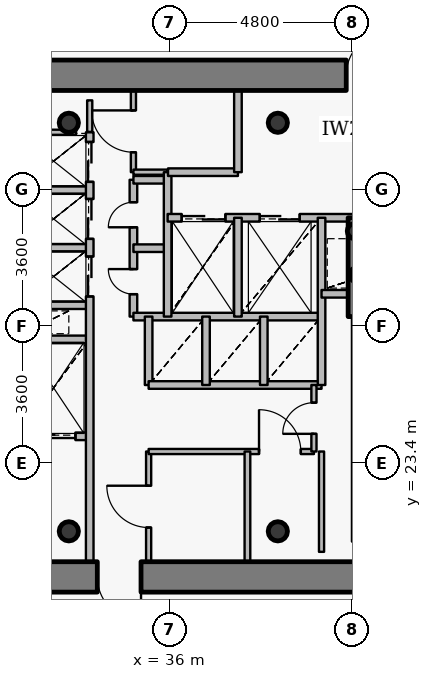
"""IFC4 building model, lengths in metres.
Left out: names, types, materials, properties, quantities, classifications, styles, units other than length and angle.
Written with IfcOpenShell. Run it as: python <this file> out.ifc"""

import sys

from ifc_helpers import new_model, si_unit, direction, frame, frame_2d, origin, origin_2d, place, context, subcontext, project, spatial, rectangle, hollow_circle, extrude, source, transform, mapped, element, fill, save


model = new_model("IFC4")
c1 = context("Model", 3, precision=1e-05, world=origin(), true_north=direction((0.0, 1.0)))
c2 = subcontext(c1, "Body", "Model", "MODEL_VIEW")
j1 = project(units=[si_unit("LENGTHUNIT", "METRE"), si_unit("PLANEANGLEUNIT", "RADIAN")], contexts=[c1])
p1 = place(None, origin())
s1 = spatial("IfcSite", under=j1, at=p1, CompositionType="ELEMENT")
p2 = place(p1, origin())
s2 = spatial("IfcBuilding", under=s1, at=p2, CompositionType="ELEMENT")
p3 = place(p2, frame((0.0, 0.0, 193.65)))
s3 = spatial("IfcBuildingStorey", under=s2, at=p3, CompositionType="ELEMENT", Elevation=193.65)
for number, where, z_axis, x_axis in (
    (1, (33.35, 21.6, 0.0), (0.0, 0.0, 1.0), (1.0, 0.0, 0.0)),
    (2, (38.85, 21.6, 0.0), (0.0, 0.0, 1.0), (1.0, 0.0, 0.0)),
    (3, (38.85, 32.35, 0.0), (0.0, 0.0, 1.0), (1.0, 0.0, 0.0)),
    (4, (33.35, 32.35, 0.0), (0.0, 0.0, 1.0), (1.0, 0.0, 0.0)),
):
    element("IfcColumn", number, at=place(p3, frame(where, z_axis=z_axis, x_axis=x_axis)), inside=s3, PredefinedType="COLUMN", context=c2, shape_type="SweptSolid", body=[
        extrude(hollow_circle(Radius=0.254, WallThickness=0.02, at=origin_2d()), origin(), (0.0, 0.0, 1.0), 3.75),
    ])
for number, where, z_axis, x_axis in (
    (5, (40.95, 28.35, 0.0), (0.0, 0.0, 1.0), (1.0, 0.0, 0.0)),
    (6, (40.88, 29.5, 0.0), (0.0, 0.0, 1.0), (1.0, 0.0, 0.0)),
):
    element("IfcColumn", number, at=place(p3, frame(where, z_axis=z_axis, x_axis=x_axis)), inside=s3, PredefinedType="COLUMN", context=c2, shape_type="SweptSolid", body=[
        extrude(hollow_circle(Radius=0.203, WallThickness=0.016, at=origin_2d()), origin(), (0.0, 0.0, 1.0), 3.75),
    ])
p4 = place(p3, frame((27.2, 33.6, 0.0), z_axis=(0.0, 0.0, 1.0), x_axis=(1.0, 0.0, 0.0)))
e7 = element("IfcWall", 7, at=p4, inside=s3, PredefinedType="SHEAR", context=c2, shape_type="SweptSolid", body=[
    extrude(rectangle(XDim=17.6, YDim=0.8, at=frame_2d((8.8, 0.0))), origin(), (0.0, 0.0, 1.0), 2.95),
])
p5 = place(p4, frame((13.45, 0.0, 0.0)))
e8 = element("IfcOpeningElement", 8, at=p5, cuts=e7, PredefinedType="OPENING", context=c2, shape_type="SweptSolid", body=[
    extrude(rectangle(XDim=1.15, YDim=2.15, at=origin_2d()), frame((0.575, 0.41, 1.075), z_axis=(0.0, -1.0, 0.0), x_axis=(1.0, 0.0, 0.0)), (0.0, 0.0, 1.0), 0.82),
])
p6 = place(p3, frame((44.8, 20.4, 0.0), z_axis=(0.0, 0.0, 1.0), x_axis=(-1.0, 0.0, 0.0)))
e9 = element("IfcWall", 9, at=p6, inside=s3, PredefinedType="SHEAR", context=c2, shape_type="SweptSolid", body=[
    extrude(rectangle(XDim=17.6, YDim=0.8, at=frame_2d((8.8, 0.0))), origin(), (0.0, 0.0, 1.0), 2.95),
])
p7 = place(p6, frame((9.55, 0.0, 0.0)))
e10 = element("IfcOpeningElement", 10, at=p7, cuts=e9, PredefinedType="OPENING", context=c2, shape_type="SweptSolid", body=[
    extrude(rectangle(XDim=1.15, YDim=2.15, at=origin_2d()), frame((0.575, 0.41, 1.075), z_axis=(0.0, -1.0, 0.0), x_axis=(1.0, 0.0, 0.0)), (0.0, 0.0, 1.0), 0.82),
])
p8 = place(p3, frame((40.9, 27.25, 0.0), z_axis=(0.0, 0.0, 1.0), x_axis=(0.0, 1.0, 0.0)))
e11 = element("IfcWall", 11, at=p8, inside=s3, PredefinedType="SHEAR", context=c2, shape_type="SweptSolid", body=[
    extrude(rectangle(XDim=2.6, YDim=0.4, at=frame_2d((1.3, 0.0))), origin(), (0.0, 0.0, 1.0), 3.1),
])
p9 = place(p3, frame((32.0, 24.1, 0.0), z_axis=(0.0, 0.0, 1.0), x_axis=(1.0, 0.0, 0.0)))
e12 = element("IfcWall", 12, at=p9, inside=s3, PredefinedType="PARTITIONING", context=c2, shape_type="SweptSolid", body=[
    extrude(rectangle(XDim=1.9, YDim=0.2, at=frame_2d((0.95, 0.0))), origin(), (0.0, 0.0, 1.0), 3.085),
])
p10 = place(p9, frame((0.375, 0.0, 0.0)))
e13 = element("IfcOpeningElement", 13, at=p10, cuts=e12, PredefinedType="OPENING", context=c2, shape_type="SweptSolid", body=[
    extrude(rectangle(XDim=1.15, YDim=2.15, at=origin_2d()), frame((0.575, 0.11, 1.075), z_axis=(0.0, -1.0, 0.0), x_axis=(1.0, 0.0, 0.0)), (0.0, 0.0, 1.0), 0.22),
])
for number, where, z_axis, x_axis in (
    (14, (32.0, 26.65, 0.0), (0.0, 0.0, 1.0), (1.0, 0.0, 0.0)),
    (15, (32.0, 27.55, 0.0), (0.0, 0.0, 1.0), (1.0, 0.0, 0.0)),
    (16, (32.0, 29.06, 0.0), (0.0, 0.0, 1.0), (1.0, 0.0, 0.0)),
    (17, (32.0, 30.58, 0.0), (0.0, 0.0, 1.0), (1.0, 0.0, 0.0)),
):
    element("IfcWall", number, at=place(p3, frame(where, z_axis=z_axis, x_axis=x_axis)), inside=s3, PredefinedType="PARTITIONING", context=c2, shape_type="SweptSolid", body=[
        extrude(rectangle(XDim=1.9, YDim=0.2, at=frame_2d((0.95, 0.0))), origin(), (0.0, 0.0, 1.0), 3.085),
    ])
p11 = place(p3, frame((33.9, 20.8, 0.0), z_axis=(0.0, 0.0, 1.0), x_axis=(0.0, 1.0, 0.0)))
e18 = element("IfcWall", 18, at=p11, inside=s3, PredefinedType="PARTITIONING", context=c2, shape_type="SweptSolid", body=[
    extrude(rectangle(XDim=11.3, YDim=0.2, at=frame_2d((5.65, 0.0))), origin(), (0.0, 0.0, 1.0), 3.085),
])
p12 = place(p11, frame((6.98, 0.0, 0.0)))
e19 = element("IfcOpeningElement", 19, at=p12, cuts=e18, PredefinedType="OPENING", context=c2, shape_type="SweptSolid", body=[
    extrude(rectangle(XDim=1.05, YDim=2.15, at=origin_2d()), frame((0.525, 0.11, 1.075), z_axis=(0.0, -1.0, 0.0), x_axis=(1.0, 0.0, 0.0)), (0.0, 0.0, 1.0), 0.22),
])
p13 = place(p11, frame((8.495, 0.0, 0.0)))
e20 = element("IfcOpeningElement", 20, at=p13, cuts=e18, PredefinedType="OPENING", context=c2, shape_type="SweptSolid", body=[
    extrude(rectangle(XDim=1.05, YDim=2.15, at=origin_2d()), frame((0.525, 0.11, 1.075), z_axis=(0.0, -1.0, 0.0), x_axis=(1.0, 0.0, 0.0)), (0.0, 0.0, 1.0), 0.22),
])
p14 = place(p11, frame((9.995, 0.0, 0.0)))
e21 = element("IfcOpeningElement", 21, at=p14, cuts=e18, PredefinedType="OPENING", context=c2, shape_type="SweptSolid", body=[
    extrude(rectangle(XDim=1.05, YDim=2.15, at=origin_2d()), frame((0.525, 0.11, 1.075), z_axis=(0.0, -1.0, 0.0), x_axis=(1.0, 0.0, 0.0)), (0.0, 0.0, 1.0), 0.22),
])
p15 = place(p3, frame((35.05, 27.25, 0.0), z_axis=(0.0, 0.0, 1.0), x_axis=(0.0, 1.0, 0.0)))
e22 = element("IfcWall", 22, at=p15, inside=s3, PredefinedType="PARTITIONING", context=c2, shape_type="SweptSolid", body=[
    extrude(rectangle(XDim=3.6, YDim=0.2, at=frame_2d((1.8, 0.0))), origin(), (0.0, 0.0, 1.0), 3.5),
])
p16 = place(p15, frame((0.59, 0.0, 0.0)))
e23 = element("IfcOpeningElement", 23, at=p16, cuts=e22, PredefinedType="OPENING", context=c2, shape_type="SweptSolid", body=[
    extrude(rectangle(XDim=0.66, YDim=2.05, at=origin_2d()), frame((0.33, 0.11, 1.025), z_axis=(0.0, -1.0, 0.0), x_axis=(1.0, 0.0, 0.0)), (0.0, 0.0, 1.0), 0.22),
])
p17 = place(p15, frame((2.35, 0.0, 0.0)))
e24 = element("IfcOpeningElement", 24, at=p17, cuts=e22, PredefinedType="OPENING", context=c2, shape_type="SweptSolid", body=[
    extrude(rectangle(XDim=0.66, YDim=2.05, at=origin_2d()), frame((0.33, 0.11, 1.025), z_axis=(0.0, -1.0, 0.0), x_axis=(1.0, 0.0, 0.0)), (0.0, 0.0, 1.0), 0.22),
])
p18 = place(p3, frame((35.05, 27.25, 0.0), z_axis=(0.0, 0.0, 1.0), x_axis=(1.0, 0.0, 0.0)))
e25 = element("IfcWall", 25, at=p18, inside=s3, PredefinedType="PARTITIONING", context=c2, shape_type="SweptSolid", body=[
    extrude(rectangle(XDim=4.95, YDim=0.2, at=frame_2d((2.475, 0.0))), origin(), (0.0, 0.0, 1.0), 3.085),
])
for number, where, z_axis, x_axis in (
    (26, (35.05, 29.05, 0.0), (0.0, 0.0, 1.0), (1.0, 0.0, 0.0)),
    (27, (35.05, 30.85, 0.0), (0.0, 0.0, 1.0), (1.0, 0.0, 0.0)),
):
    element("IfcWall", number, at=place(p3, frame(where, z_axis=z_axis, x_axis=x_axis)), inside=s3, PredefinedType="PARTITIONING", context=c2, shape_type="SweptSolid", body=[
        extrude(rectangle(XDim=0.9, YDim=0.2, at=frame_2d((0.45, 0.0))), origin(), (0.0, 0.0, 1.0), 3.5),
    ])
p19 = place(p3, frame((35.05, 31.05, 0.0), z_axis=(0.0, 0.0, 1.0), x_axis=(0.0, 1.0, 0.0)))
e28 = element("IfcWall", 28, at=p19, inside=s3, PredefinedType="PARTITIONING", context=c2, shape_type="SweptSolid", body=[
    extrude(rectangle(XDim=2.15, YDim=0.135, at=frame_2d((1.075, 0.0))), origin(), (0.0, 0.0, 1.0), 3.085),
])
p20 = place(p19, frame((0.525, 0.0, 0.0)))
e29 = element("IfcOpeningElement", 29, at=p20, cuts=e28, PredefinedType="OPENING", context=c2, shape_type="SweptSolid", body=[
    extrude(rectangle(XDim=1.1, YDim=2.15, at=origin_2d()), frame((0.55, 0.078, 1.075), z_axis=(0.0, -1.0, 0.0), x_axis=(1.0, 0.0, 0.0)), (0.0, 0.0, 1.0), 0.155),
])
p21 = place(p3, frame((35.05, 31.05, 0.0), z_axis=(0.0, 0.0, 1.0), x_axis=(1.0, 0.0, 0.0)))
e30 = element("IfcWall", 30, at=p21, inside=s3, PredefinedType="PARTITIONING", context=c2, shape_type="SweptSolid", body=[
    extrude(rectangle(XDim=0.9, YDim=0.135, at=frame_2d((0.45, 0.0))), origin(), (0.0, 0.0, 1.0), 3.5),
])
p22 = place(p3, frame((35.45, 20.8, 0.0), z_axis=(0.0, 0.0, 1.0), x_axis=(0.0, 1.0, 0.0)))
e31 = element("IfcWall", 31, at=p22, inside=s3, PredefinedType="PARTITIONING", context=c2, shape_type="SweptSolid", body=[
    extrude(rectangle(XDim=2.9, YDim=0.135, at=frame_2d((1.45, 0.0))), origin(), (0.0, 0.0, 1.0), 3.085),
])
p23 = place(p22, frame((0.9, 0.0, 0.0)))
e32 = element("IfcOpeningElement", 32, at=p23, cuts=e31, PredefinedType="OPENING", context=c2, shape_type="SweptSolid", body=[
    extrude(rectangle(XDim=1.1, YDim=2.15, at=origin_2d()), frame((0.55, 0.078, 1.075), z_axis=(0.0, -1.0, 0.0), x_axis=(1.0, 0.0, 0.0)), (0.0, 0.0, 1.0), 0.155),
])
p24 = place(p3, frame((35.45, 23.7, 0.0), z_axis=(0.0, 0.0, 1.0), x_axis=(1.0, 0.0, 0.0)))
e33 = element("IfcWall", 33, at=p24, inside=s3, PredefinedType="PARTITIONING", context=c2, shape_type="SweptSolid", body=[
    extrude(rectangle(XDim=4.35, YDim=0.135, at=frame_2d((2.175, 0.0))), origin(), (0.0, 0.0, 1.0), 3.085),
])
p25 = place(p24, frame((2.905, 0.0, 0.0)))
e34 = element("IfcOpeningElement", 34, at=p25, cuts=e33, PredefinedType="OPENING", context=c2, shape_type="SweptSolid", body=[
    extrude(rectangle(XDim=1.1, YDim=2.15, at=origin_2d()), frame((0.55, 0.078, 1.075), z_axis=(0.0, -1.0, 0.0), x_axis=(1.0, 0.0, 0.0)), (0.0, 0.0, 1.0), 0.155),
])
p26 = place(p3, frame((35.45, 25.45, 0.0), z_axis=(0.0, 0.0, 1.0), x_axis=(0.0, 1.0, 0.0)))
e35 = element("IfcWall", 35, at=p26, inside=s3, PredefinedType="PARTITIONING", context=c2, shape_type="SweptSolid", body=[
    extrude(rectangle(XDim=1.8, YDim=0.2, at=frame_2d((0.9, 0.0))), origin(), (0.0, 0.0, 1.0), 3.5),
])
p27 = place(p3, frame((35.45, 25.45, 0.0), z_axis=(0.0, 0.0, 1.0), x_axis=(1.0, 0.0, 0.0)))
e36 = element("IfcWall", 36, at=p27, inside=s3, PredefinedType="PARTITIONING", context=c2, shape_type="SweptSolid", body=[
    extrude(rectangle(XDim=4.55, YDim=0.2, at=frame_2d((2.275, 0.0))), origin(), (0.0, 0.0, 1.0), 3.085),
])
p28 = place(p3, frame((35.95, 27.25, 0.0), z_axis=(0.0, 0.0, 1.0), x_axis=(0.0, 1.0, 0.0)))
e37 = element("IfcWall", 37, at=p28, inside=s3, PredefinedType="PARTITIONING", context=c2, shape_type="SweptSolid", body=[
    extrude(rectangle(XDim=3.8, YDim=0.2, at=frame_2d((1.9, 0.0))), origin(), (0.0, 0.0, 1.0), 3.5),
])
p29 = place(p3, frame((35.95, 29.85, 0.0), z_axis=(0.0, 0.0, 1.0), x_axis=(1.0, 0.0, 0.0)))
e38 = element("IfcWall", 38, at=p29, inside=s3, PredefinedType="PARTITIONING", context=c2, shape_type="SweptSolid", body=[
    extrude(rectangle(XDim=8.49, YDim=0.2, at=frame_2d((4.245, 0.0))), origin(), (0.0, 0.0, 1.0), 3.085),
])
p30 = place(p29, frame((6.1, 0.0, 0.0)))
e39 = element("IfcOpeningElement", 39, at=p30, cuts=e38, PredefinedType="OPENING", context=c2, shape_type="SweptSolid", body=[
    extrude(rectangle(XDim=1.2, YDim=2.15, at=origin_2d()), frame((0.6, 0.11, 1.075), z_axis=(0.0, -1.0, 0.0), x_axis=(1.0, 0.0, 0.0)), (0.0, 0.0, 1.0), 0.22),
])
p31 = place(p29, frame((0.37, 0.0, 0.0)))
e40 = element("IfcOpeningElement", 40, at=p31, cuts=e38, PredefinedType="OPENING", context=c2, shape_type="SweptSolid", body=[
    extrude(rectangle(XDim=1.15, YDim=2.15, at=origin_2d()), frame((0.575, 0.11, 1.075), z_axis=(0.0, -1.0, 0.0), x_axis=(1.0, 0.0, 0.0)), (0.0, 0.0, 1.0), 0.22),
])
p32 = place(p29, frame((2.425, 0.0, 0.0)))
e41 = element("IfcOpeningElement", 41, at=p32, cuts=e38, PredefinedType="OPENING", context=c2, shape_type="SweptSolid", body=[
    extrude(rectangle(XDim=1.05, YDim=2.15, at=origin_2d()), frame((0.525, 0.11, 1.075), z_axis=(0.0, -1.0, 0.0), x_axis=(1.0, 0.0, 0.0)), (0.0, 0.0, 1.0), 0.22),
])
p33 = place(p3, frame((35.96, 31.05, 0.0), z_axis=(0.0, 0.0, 1.0), x_axis=(1.0, 0.0, 0.0)))
e42 = element("IfcWall", 42, at=p33, inside=s3, PredefinedType="PARTITIONING", context=c2, shape_type="SweptSolid", body=[
    extrude(rectangle(XDim=1.84, YDim=0.2, at=frame_2d((0.92, 0.0))), origin(), (0.0, 0.0, 1.0), 3.5),
])
p34 = place(p3, frame((36.96, 25.45, 0.0), z_axis=(0.0, 0.0, 1.0), x_axis=(0.0, 1.0, 0.0)))
e43 = element("IfcWall", 43, at=p34, inside=s3, PredefinedType="PARTITIONING", context=c2, shape_type="SweptSolid", body=[
    extrude(rectangle(XDim=1.8, YDim=0.2, at=frame_2d((0.9, 0.0))), origin(), (0.0, 0.0, 1.0), 3.5),
])
p35 = place(p3, frame((37.8, 27.25, 0.0), z_axis=(0.0, 0.0, 1.0), x_axis=(0.0, 1.0, 0.0)))
e44 = element("IfcWall", 44, at=p35, inside=s3, PredefinedType="PARTITIONING", context=c2, shape_type="SweptSolid", body=[
    extrude(rectangle(XDim=2.6, YDim=0.2, at=frame_2d((1.3, 0.0))), origin(), (0.0, 0.0, 1.0), 3.5),
])
p36 = place(p3, frame((37.8, 31.05, 0.0), z_axis=(0.0, 0.0, 1.0), x_axis=(0.0, 1.0, 0.0)))
e45 = element("IfcWall", 45, at=p36, inside=s3, PredefinedType="PARTITIONING", context=c2, shape_type="SweptSolid", body=[
    extrude(rectangle(XDim=2.15, YDim=0.2, at=frame_2d((1.075, 0.0))), origin(), (0.0, 0.0, 1.0), 3.085),
])
p37 = place(p3, frame((38.05, 20.18, 0.0), z_axis=(0.0, 0.0, 1.0), x_axis=(0.0, 1.0, 0.0)))
e46 = element("IfcWall", 46, at=p37, inside=s3, PredefinedType="PARTITIONING", context=c2, shape_type="SweptSolid", body=[
    extrude(rectangle(XDim=3.52, YDim=0.15, at=frame_2d((1.76, 0.0))), origin(), (0.0, 0.0, 1.0), 2.935),
])
p38 = place(p3, frame((38.48, 25.45, 0.0), z_axis=(0.0, 0.0, 1.0), x_axis=(0.0, 1.0, 0.0)))
e47 = element("IfcWall", 47, at=p38, inside=s3, PredefinedType="PARTITIONING", context=c2, shape_type="SweptSolid", body=[
    extrude(rectangle(XDim=1.8, YDim=0.2, at=frame_2d((0.9, 0.0))), origin(), (0.0, 0.0, 1.0), 3.5),
])
p39 = place(p3, frame((39.8, 23.7, 0.0), z_axis=(0.0, 0.0, 1.0), x_axis=(0.0, 1.0, 0.0)))
e48 = element("IfcWall", 48, at=p39, inside=s3, PredefinedType="PARTITIONING", context=c2, shape_type="SweptSolid", body=[
    extrude(rectangle(XDim=1.75, YDim=0.135, at=frame_2d((0.875, 0.0))), origin(), (0.0, 0.0, 1.0), 3.5),
])
p40 = place(p39, frame((0.465, 0.0, 0.0)))
e49 = element("IfcOpeningElement", 49, at=p40, cuts=e48, PredefinedType="OPENING", context=c2, shape_type="SweptSolid", body=[
    extrude(rectangle(XDim=0.82, YDim=2.1, at=origin_2d()), frame((0.41, 0.078, 1.05), z_axis=(0.0, -1.0, 0.0), x_axis=(1.0, 0.0, 0.0)), (0.0, 0.0, 1.0), 0.155),
])
p41 = place(p3, frame((40.0, 25.45, 0.0), z_axis=(0.0, 0.0, 1.0), x_axis=(0.0, 1.0, 0.0)))
e50 = element("IfcWall", 50, at=p41, inside=s3, PredefinedType="PARTITIONING", context=c2, shape_type="SweptSolid", body=[
    extrude(rectangle(XDim=4.4, YDim=0.2, at=frame_2d((2.2, 0.0))), origin(), (0.0, 0.0, 1.0), 3.5),
])
p42 = place(p3, frame((40.0, 27.85, 0.0), z_axis=(0.0, 0.0, 1.0), x_axis=(1.0, 0.0, 0.0)))
e51 = element("IfcWall", 51, at=p42, inside=s3, PredefinedType="PARTITIONING", context=c2, shape_type="SweptSolid", body=[
    extrude(rectangle(XDim=0.9, YDim=0.2, at=frame_2d((0.45, 0.0))), origin(), (0.0, 0.0, 1.0), 3.5),
])
p43 = place(p3, frame((40.9, 21.33, 0.0), z_axis=(0.0, 0.0, 1.0), x_axis=(0.0, 1.0, 0.0)))
e52 = element("IfcWall", 52, at=p43, inside=s3, PredefinedType="PARTITIONING", context=c2, shape_type="SweptSolid", body=[
    extrude(rectangle(XDim=5.91, YDim=0.2, at=frame_2d((2.955, 0.0))), origin(), (0.0, 0.0, 1.0), 3.035),
])
p44 = place(p3, frame((32.36, 32.1, 0.0), z_axis=(0.0, 0.0, 1.0), x_axis=(1.0, 0.0, 0.0)))
e53 = element("IfcWall", 53, at=p44, inside=s3, PredefinedType="PARTITIONING", context=c2, shape_type="SweptSolid", body=[
    extrude(rectangle(XDim=1.18, YDim=0.135, at=frame_2d((0.59, 0.0))), origin(), (0.0, 0.0, 1.0), 3.085),
])
p45 = place(p3, frame((40.0, 23.7, 0.0), z_axis=(0.0, 0.0, 1.0), x_axis=(0.0, -1.0, 0.0)))
e54 = element("IfcWall", 54, at=p45, inside=s3, PredefinedType="PARTITIONING", context=c2, shape_type="SweptSolid", body=[
    extrude(rectangle(XDim=2.64, YDim=0.135, at=frame_2d((1.32, 0.0))), origin(), (0.0, 0.0, 1.0), 3.035),
])
p46 = place(p3, frame((33.9, 32.11, 0.0), z_axis=(0.0, 0.0, 1.0), x_axis=(0.0, 1.0, 0.0)))
e55 = element("IfcWall", 55, at=p46, inside=s3, PredefinedType="PARTITIONING", context=c2, shape_type="SweptSolid", body=[
    extrude(rectangle(XDim=0.83, YDim=0.135, at=frame_2d((0.415, 0.0))), origin(), (0.0, 0.0, 1.0), 3.085),
])
m1 = source(origin(), c2, "Body", "SweptSolid", [
    extrude(rectangle(XDim=1.15, YDim=2.15, at=origin_2d()), frame((0.575, 0.025, 1.075), z_axis=(0.0, -1.0, 0.0), x_axis=(1.0, 0.0, 0.0)), (0.0, 0.0, 1.0), 0.05),
])
p47 = place(p5, origin())
e56 = element("IfcDoor", 56, at=p47, inside=s3, OperationType="SINGLE_SWING_RIGHT", PredefinedType="DOOR", context=c2, shape_type="MappedRepresentation", body=[
    mapped(m1, transform((0.0, 0.0, 0.0), x_axis=(1.0, 0.0, 0.0), y_axis=(0.0, 1.0, 0.0), z_axis=(0.0, 0.0, 1.0), scale=1.0)),
])
fill(e8, e56)
p48 = place(p7, origin())
e57 = element("IfcDoor", 57, at=p48, inside=s3, OperationType="SINGLE_SWING_LEFT", PredefinedType="DOOR", context=c2, shape_type="MappedRepresentation", body=[
    mapped(m1, transform((0.0, 0.0, 0.0), x_axis=(1.0, 0.0, 0.0), y_axis=(0.0, 1.0, 0.0), z_axis=(0.0, 0.0, 1.0), scale=1.0)),
])
fill(e10, e57)
m2 = source(origin(), c2, "Body", "SweptSolid", [
    extrude(rectangle(XDim=1.15, YDim=2.15, at=origin_2d()), frame((0.575, 0.025, 1.075), z_axis=(0.0, -1.0, 0.0), x_axis=(1.0, 0.0, 0.0)), (0.0, 0.0, 1.0), 0.05),
])
p49 = place(p31, origin())
e58 = element("IfcDoor", 58, at=p49, inside=s3, OperationType="DOUBLE_DOOR_SLIDING", PredefinedType="USERDEFINED", context=c2, shape_type="MappedRepresentation", body=[
    mapped(m2, transform((0.0, 0.0, 0.0), x_axis=(1.0, 0.0, 0.0), y_axis=(0.0, 1.0, 0.0), z_axis=(0.0, 0.0, 1.0), scale=1.0)),
])
fill(e40, e58)
p50 = place(p10, origin())
e59 = element("IfcDoor", 59, at=p50, inside=s3, OperationType="DOUBLE_DOOR_SLIDING", PredefinedType="USERDEFINED", context=c2, shape_type="MappedRepresentation", body=[
    mapped(m2, transform((0.0, 0.0, 0.0), x_axis=(1.0, 0.0, 0.0), y_axis=(0.0, 1.0, 0.0), z_axis=(0.0, 0.0, 1.0), scale=1.0)),
])
fill(e13, e59)
m3 = source(origin(), c2, "Body", "SweptSolid", [
    extrude(rectangle(XDim=1.05, YDim=2.15, at=origin_2d()), frame((0.525, 0.025, 1.075), z_axis=(0.0, -1.0, 0.0), x_axis=(1.0, 0.0, 0.0)), (0.0, 0.0, 1.0), 0.05),
])
p51 = place(p32, origin())
e60 = element("IfcDoor", 60, at=p51, inside=s3, OperationType="DOUBLE_DOOR_SLIDING", PredefinedType="USERDEFINED", context=c2, shape_type="MappedRepresentation", body=[
    mapped(m3, transform((0.0, 0.0, 0.0), x_axis=(1.0, 0.0, 0.0), y_axis=(0.0, 1.0, 0.0), z_axis=(0.0, 0.0, 1.0), scale=1.0)),
])
fill(e41, e60)
p52 = place(p12, origin())
e61 = element("IfcDoor", 61, at=p52, inside=s3, OperationType="DOUBLE_DOOR_SLIDING", PredefinedType="USERDEFINED", context=c2, shape_type="MappedRepresentation", body=[
    mapped(m3, transform((0.0, 0.0, 0.0), x_axis=(1.0, 0.0, 0.0), y_axis=(0.0, 1.0, 0.0), z_axis=(0.0, 0.0, 1.0), scale=1.0)),
])
fill(e19, e61)
p53 = place(p13, origin())
e62 = element("IfcDoor", 62, at=p53, inside=s3, OperationType="DOUBLE_DOOR_SLIDING", PredefinedType="USERDEFINED", context=c2, shape_type="MappedRepresentation", body=[
    mapped(m3, transform((0.0, 0.0, 0.0), x_axis=(1.0, 0.0, 0.0), y_axis=(0.0, 1.0, 0.0), z_axis=(0.0, 0.0, 1.0), scale=1.0)),
])
fill(e20, e62)
p54 = place(p14, origin())
e63 = element("IfcDoor", 63, at=p54, inside=s3, OperationType="DOUBLE_DOOR_SLIDING", PredefinedType="USERDEFINED", context=c2, shape_type="MappedRepresentation", body=[
    mapped(m3, transform((0.0, 0.0, 0.0), x_axis=(1.0, 0.0, 0.0), y_axis=(0.0, 1.0, 0.0), z_axis=(0.0, 0.0, 1.0), scale=1.0)),
])
fill(e21, e63)
m4 = source(origin(), c2, "Body", "SweptSolid", [
    extrude(rectangle(XDim=0.66, YDim=2.05, at=origin_2d()), frame((0.33, 0.025, 1.025), z_axis=(0.0, -1.0, 0.0), x_axis=(1.0, 0.0, 0.0)), (0.0, 0.0, 1.0), 0.05),
])
p55 = place(p16, origin())
e64 = element("IfcDoor", 64, at=p55, inside=s3, OperationType="SINGLE_SWING_RIGHT", PredefinedType="USERDEFINED", context=c2, shape_type="MappedRepresentation", body=[
    mapped(m4, transform((0.0, 0.0, 0.0), x_axis=(1.0, 0.0, 0.0), y_axis=(0.0, 1.0, 0.0), z_axis=(0.0, 0.0, 1.0), scale=1.0)),
])
fill(e23, e64)
p56 = place(p17, origin())
e65 = element("IfcDoor", 65, at=p56, inside=s3, OperationType="SINGLE_SWING_LEFT", PredefinedType="USERDEFINED", context=c2, shape_type="MappedRepresentation", body=[
    mapped(m4, transform((0.0, 0.0, 0.0), x_axis=(1.0, 0.0, 0.0), y_axis=(0.0, 1.0, 0.0), z_axis=(0.0, 0.0, 1.0), scale=1.0)),
])
fill(e24, e65)
m5 = source(origin(), c2, "Body", "SweptSolid", [
    extrude(rectangle(XDim=1.1, YDim=2.15, at=origin_2d()), frame((0.55, 0.025, 1.075), z_axis=(0.0, -1.0, 0.0), x_axis=(1.0, 0.0, 0.0)), (0.0, 0.0, 1.0), 0.05),
])
p57 = place(p23, origin())
e66 = element("IfcDoor", 66, at=p57, inside=s3, OperationType="SINGLE_SWING_RIGHT", PredefinedType="DOOR", context=c2, shape_type="MappedRepresentation", body=[
    mapped(m5, transform((0.0, 0.0, 0.0), x_axis=(1.0, 0.0, 0.0), y_axis=(0.0, 1.0, 0.0), z_axis=(0.0, 0.0, 1.0), scale=1.0)),
])
fill(e32, e66)
p58 = place(p25, origin())
e67 = element("IfcDoor", 67, at=p58, inside=s3, OperationType="SINGLE_SWING_LEFT", PredefinedType="DOOR", context=c2, shape_type="MappedRepresentation", body=[
    mapped(m5, transform((0.0, 0.0, 0.0), x_axis=(1.0, 0.0, 0.0), y_axis=(0.0, 1.0, 0.0), z_axis=(0.0, 0.0, 1.0), scale=1.0)),
])
fill(e34, e67)
p59 = place(p20, origin())
e68 = element("IfcDoor", 68, at=p59, inside=s3, OperationType="SINGLE_SWING_RIGHT", PredefinedType="DOOR", context=c2, shape_type="MappedRepresentation", body=[
    mapped(m5, transform((0.0, 0.0, 0.0), x_axis=(1.0, 0.0, 0.0), y_axis=(0.0, 1.0, 0.0), z_axis=(0.0, 0.0, 1.0), scale=1.0)),
])
fill(e29, e68)
m6 = source(origin(), c2, "Body", "SweptSolid", [
    extrude(rectangle(XDim=0.82, YDim=2.1, at=origin_2d()), frame((0.41, 0.025, 1.05), z_axis=(0.0, -1.0, 0.0), x_axis=(1.0, 0.0, 0.0)), (0.0, 0.0, 1.0), 0.05),
])
p60 = place(p40, origin())
e69 = element("IfcDoor", 69, at=p60, inside=s3, OperationType="SINGLE_SWING_LEFT", PredefinedType="DOOR", context=c2, shape_type="MappedRepresentation", body=[
    mapped(m6, transform((0.0, 0.0, 0.0), x_axis=(1.0, 0.0, 0.0), y_axis=(0.0, 1.0, 0.0), z_axis=(0.0, 0.0, 1.0), scale=1.0)),
])
fill(e49, e69)
save(model, sys.argv[1])
